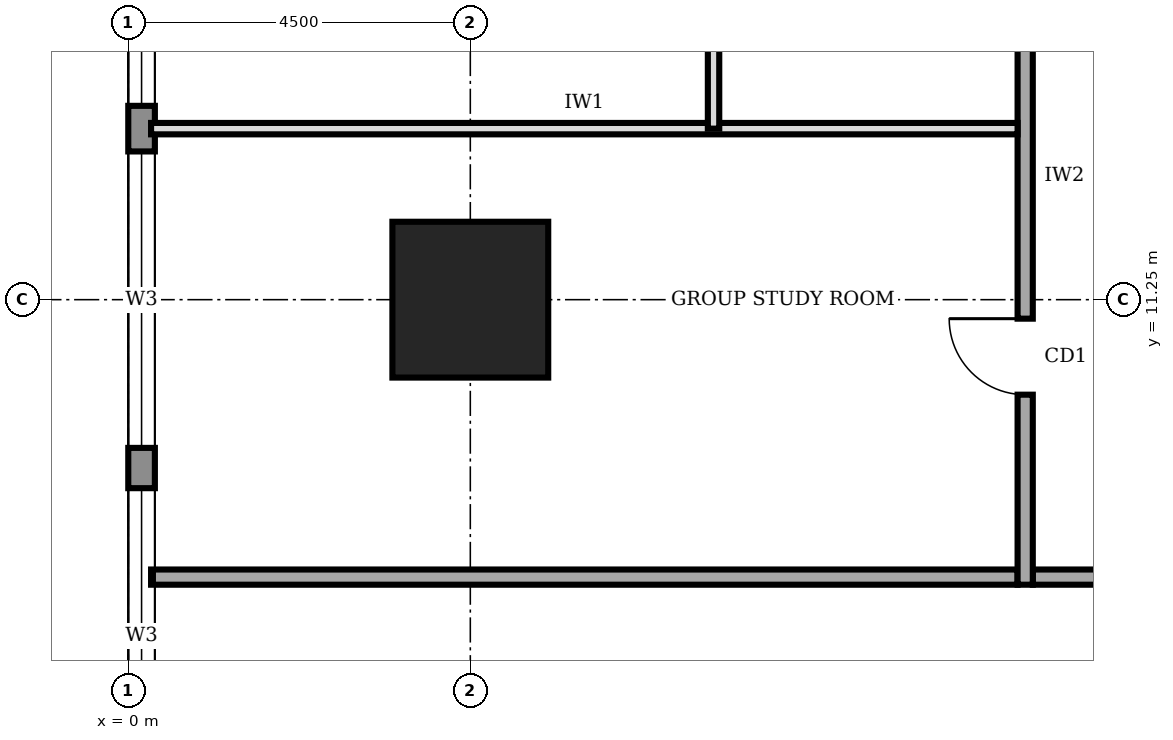
"""IFC4 building model, lengths in metres.
Left out: names, types, materials, properties, quantities, classifications, styles, units other than length and angle.
Written with IfcOpenShell. Run it as: python <this file> out.ifc"""

import sys

from ifc_helpers import new_model, si_unit, direction, frame, frame_2d, origin, origin_2d, place, context, subcontext, project, spatial, rectangle, extrude, element, fill, save


model = new_model("IFC4")
c1 = context("Model", 3, precision=1e-05, world=origin(), true_north=direction((0.0, 1.0)))
c2 = subcontext(c1, "Body", "Model", "MODEL_VIEW")
j1 = project(units=[si_unit("LENGTHUNIT", "METRE"), si_unit("PLANEANGLEUNIT", "RADIAN")], contexts=[c1])
p1 = place(None, origin())
s1 = spatial("IfcSite", under=j1, at=p1, CompositionType="ELEMENT")
p2 = place(p1, origin())
s2 = spatial("IfcBuilding", under=s1, at=p2, CompositionType="ELEMENT")
p3 = place(p2, frame((0.0, 0.0, 189.0)))
s3 = spatial("IfcBuildingStorey", under=s2, at=p3, CompositionType="ELEMENT", Elevation=189.0)
p4 = place(p3, frame((4.5, 11.25, 0.0), z_axis=(0.0, 0.0, 1.0), x_axis=(1.0, 0.0, 0.0)))
e1 = element("IfcColumn", 1, at=p4, inside=s3, PredefinedType="COLUMN", context=c2, shape_type="SweptSolid", body=[
    extrude(rectangle(XDim=2.05, YDim=2.05, at=origin_2d()), origin(), (0.0, 0.0, 1.0), 4.0),
])
p5 = place(p3, frame((0.175, 35.98, 0.0), z_axis=(0.0, 0.0, 1.0), x_axis=(0.0, -1.0, 0.0)))
e2 = element("IfcWall", 2, at=p5, inside=s3, PredefinedType="STANDARD", context=c2, shape_type="SweptSolid", body=[
    extrude(rectangle(XDim=31.46, YDim=0.35, at=frame_2d((15.73, 0.0))), origin(), (0.0, 0.0, 1.0), 3.75),
])
p6 = place(p5, frame((27.21, 0.0, 0.95)))
e3 = element("IfcOpeningElement", 3, at=p6, cuts=e2, PredefinedType="OPENING", context=c2, shape_type="SweptSolid", body=[
    extrude(rectangle(XDim=3.9, YDim=1.8, at=frame_2d((1.95, 0.9))), frame((0.0, 0.185, 0.0), z_axis=(0.0, -1.0, 0.0), x_axis=(1.0, 0.0, 0.0)), (0.0, 0.0, 1.0), 0.37),
])
p7 = place(p5, frame((22.78, 0.0, 0.95)))
e4 = element("IfcOpeningElement", 4, at=p7, cuts=e2, PredefinedType="OPENING", context=c2, shape_type="SweptSolid", body=[
    extrude(rectangle(XDim=3.9, YDim=1.8, at=frame_2d((1.95, 0.9))), frame((0.0, 0.185, 0.0), z_axis=(0.0, -1.0, 0.0), x_axis=(1.0, 0.0, 0.0)), (0.0, 0.0, 1.0), 0.37),
])
p8 = place(p5, frame((18.28, 0.0, 0.95)))
e5 = element("IfcOpeningElement", 5, at=p8, cuts=e2, PredefinedType="OPENING", context=c2, shape_type="SweptSolid", body=[
    extrude(rectangle(XDim=3.9, YDim=1.8, at=frame_2d((1.95, 0.9))), frame((0.0, 0.185, 0.0), z_axis=(0.0, -1.0, 0.0), x_axis=(1.0, 0.0, 0.0)), (0.0, 0.0, 1.0), 0.37),
])
p9 = place(p5, frame((13.78, 0.0, 0.95)))
e6 = element("IfcOpeningElement", 6, at=p9, cuts=e2, PredefinedType="OPENING", context=c2, shape_type="SweptSolid", body=[
    extrude(rectangle(XDim=3.9, YDim=1.8, at=frame_2d((1.95, 0.9))), frame((0.0, 0.185, 0.0), z_axis=(0.0, -1.0, 0.0), x_axis=(1.0, 0.0, 0.0)), (0.0, 0.0, 1.0), 0.37),
])
p10 = place(p5, frame((9.28, 0.0, 0.95)))
e7 = element("IfcOpeningElement", 7, at=p10, cuts=e2, PredefinedType="OPENING", context=c2, shape_type="SweptSolid", body=[
    extrude(rectangle(XDim=3.9, YDim=1.8, at=frame_2d((1.95, 0.9))), frame((0.0, 0.185, 0.0), z_axis=(0.0, -1.0, 0.0), x_axis=(1.0, 0.0, 0.0)), (0.0, 0.0, 1.0), 0.37),
])
p11 = place(p5, frame((4.78, 0.0, 0.95)))
e8 = element("IfcOpeningElement", 8, at=p11, cuts=e2, PredefinedType="OPENING", context=c2, shape_type="SweptSolid", body=[
    extrude(rectangle(XDim=3.9, YDim=1.8, at=frame_2d((1.95, 0.9))), frame((0.0, 0.185, 0.0), z_axis=(0.0, -1.0, 0.0), x_axis=(1.0, 0.0, 0.0)), (0.0, 0.0, 1.0), 0.37),
])
p12 = place(p3, frame((11.9, 7.6, 0.0), z_axis=(0.0, 0.0, 1.0), x_axis=(1.0, 0.0, 0.0)))
e9 = element("IfcWall", 9, at=p12, inside=s3, PredefinedType="SOLIDWALL", context=c2, shape_type="SweptSolid", body=[
    extrude(rectangle(XDim=16.9, YDim=0.2, at=frame_2d((8.45, 0.0))), origin(), (0.0, 0.0, 1.0), 3.75),
])
p13 = place(p12, frame((2.05, 0.0, 0.0)))
e10 = element("IfcOpeningElement", 10, at=p13, cuts=e9, PredefinedType="OPENING", context=c2, shape_type="SweptSolid", body=[
    extrude(rectangle(XDim=1.8, YDim=2.1, at=frame_2d((0.9, 1.05))), frame((0.0, 0.11, 0.0), z_axis=(0.0, -1.0, 0.0), x_axis=(1.0, 0.0, 0.0)), (0.0, 0.0, 1.0), 0.22),
])
p14 = place(p12, frame((7.85, 0.0, 0.0)))
e11 = element("IfcOpeningElement", 11, at=p14, cuts=e9, PredefinedType="OPENING", context=c2, shape_type="SweptSolid", body=[
    extrude(rectangle(XDim=1.0, YDim=2.1, at=frame_2d((0.5, 1.05))), frame((0.0, 0.11, 0.0), z_axis=(0.0, -1.0, 0.0), x_axis=(1.0, 0.0, 0.0)), (0.0, 0.0, 1.0), 0.22),
])
p15 = place(p12, frame((12.85, 0.0, 0.0)))
e12 = element("IfcOpeningElement", 12, at=p15, cuts=e9, PredefinedType="OPENING", context=c2, shape_type="SweptSolid", body=[
    extrude(rectangle(XDim=1.8, YDim=2.1, at=frame_2d((0.9, 1.05))), frame((0.0, 0.11, 0.0), z_axis=(0.0, -1.0, 0.0), x_axis=(1.0, 0.0, 0.0)), (0.0, 0.0, 1.0), 0.22),
])
p16 = place(p3, frame((11.8, 32.8, 0.0), z_axis=(0.0, 0.0, 1.0), x_axis=(0.0, -1.0, 0.0)))
e13 = element("IfcWall", 13, at=p16, inside=s3, PredefinedType="SOLIDWALL", context=c2, shape_type="SweptSolid", body=[
    extrude(rectangle(XDim=25.3, YDim=0.2, at=frame_2d((12.65, 0.0))), origin(), (0.0, 0.0, 1.0), 3.75),
])
p17 = place(p16, frame((21.8, 0.0, 0.0)))
e14 = element("IfcOpeningElement", 14, at=p17, cuts=e13, PredefinedType="OPENING", context=c2, shape_type="SweptSolid", body=[
    extrude(rectangle(XDim=1.0, YDim=2.1, at=frame_2d((0.5, 1.05))), frame((0.0, 0.11, 0.0), z_axis=(0.0, -1.0, 0.0), x_axis=(1.0, 0.0, 0.0)), (0.0, 0.0, 1.0), 0.22),
])
p18 = place(p16, frame((17.15, 0.0, 0.0)))
e15 = element("IfcOpeningElement", 15, at=p18, cuts=e13, PredefinedType="OPENING", context=c2, shape_type="SweptSolid", body=[
    extrude(rectangle(XDim=0.9, YDim=2.1, at=frame_2d((0.45, 1.05))), frame((0.0, 0.11, 0.0), z_axis=(0.0, -1.0, 0.0), x_axis=(1.0, 0.0, 0.0)), (0.0, 0.0, 1.0), 0.22),
])
p19 = place(p16, frame((12.35, 0.0, 0.0)))
e16 = element("IfcOpeningElement", 16, at=p19, cuts=e13, PredefinedType="OPENING", context=c2, shape_type="SweptSolid", body=[
    extrude(rectangle(XDim=0.9, YDim=2.1, at=frame_2d((0.45, 1.05))), frame((0.0, 0.11, 0.0), z_axis=(0.0, -1.0, 0.0), x_axis=(1.0, 0.0, 0.0)), (0.0, 0.0, 1.0), 0.22),
])
p20 = place(p16, frame((9.3, 0.0, 0.0)))
e17 = element("IfcOpeningElement", 17, at=p20, cuts=e13, PredefinedType="OPENING", context=c2, shape_type="SweptSolid", body=[
    extrude(rectangle(XDim=0.9, YDim=2.1, at=frame_2d((0.45, 1.05))), frame((0.0, 0.11, 0.0), z_axis=(0.0, -1.0, 0.0), x_axis=(1.0, 0.0, 0.0)), (0.0, 0.0, 1.0), 0.22),
])
p21 = place(p16, frame((6.3, 0.0, 0.0)))
e18 = element("IfcOpeningElement", 18, at=p21, cuts=e13, PredefinedType="OPENING", context=c2, shape_type="SweptSolid", body=[
    extrude(rectangle(XDim=1.0, YDim=2.1, at=frame_2d((0.5, 1.05))), frame((0.0, 0.11, 0.0), z_axis=(0.0, -1.0, 0.0), x_axis=(1.0, 0.0, 0.0)), (0.0, 0.0, 1.0), 0.22),
])
p22 = place(p16, frame((14.4, 0.0, 0.0)))
e19 = element("IfcOpeningElement", 19, at=p22, cuts=e13, PredefinedType="OPENING", context=c2, shape_type="SweptSolid", body=[
    extrude(rectangle(XDim=1.0, YDim=2.1, at=frame_2d((0.5, 1.05))), frame((0.0, 0.11, 0.0), z_axis=(0.0, -1.0, 0.0), x_axis=(1.0, 0.0, 0.0)), (0.0, 0.0, 1.0), 0.22),
])
p23 = place(p16, frame((2.3, 0.0, 0.0)))
e20 = element("IfcOpeningElement", 20, at=p23, cuts=e13, PredefinedType="OPENING", context=c2, shape_type="SweptSolid", body=[
    extrude(rectangle(XDim=1.0, YDim=2.1, at=frame_2d((0.5, 1.05))), frame((0.0, 0.11, 0.0), z_axis=(0.0, -1.0, 0.0), x_axis=(1.0, 0.0, 0.0)), (0.0, 0.0, 1.0), 0.22),
])
p24 = place(p3, frame((0.3, 7.6, 0.0), z_axis=(0.0, 0.0, 1.0), x_axis=(1.0, 0.0, 0.0)))
e21 = element("IfcWall", 21, at=p24, inside=s3, PredefinedType="SOLIDWALL", context=c2, shape_type="SweptSolid", body=[
    extrude(rectangle(XDim=11.4, YDim=0.2, at=frame_2d((5.7, 0.0))), origin(), (0.0, 0.0, 1.0), 3.75),
])
p25 = place(p3, frame((0.3, 13.5, 0.0), z_axis=(0.0, 0.0, 1.0), x_axis=(1.0, 0.0, 0.0)))
e22 = element("IfcWall", 22, at=p25, inside=s3, PredefinedType="PARTITIONING", context=c2, shape_type="SweptSolid", body=[
    extrude(rectangle(XDim=11.4, YDim=0.15, at=frame_2d((5.7, 0.0))), origin(), (0.0, 0.0, 1.0), 3.75),
])
p26 = place(p3, frame((7.7, 13.5, 0.0), z_axis=(0.0, 0.0, 1.0), x_axis=(0.0, 1.0, 0.0)))
e23 = element("IfcWall", 23, at=p26, inside=s3, PredefinedType="PARTITIONING", context=c2, shape_type="SweptSolid", body=[
    extrude(rectangle(XDim=3.4, YDim=0.15, at=frame_2d((1.7, 0.0))), origin(), (0.0, 0.0, 1.0), 3.75),
])
p27 = place(p6, origin())
e24 = element("IfcWindow", 24, at=p27, inside=s3, PartitioningType="SINGLE_PANEL", PredefinedType="WINDOW", context=c2, shape_type="SweptSolid", body=[
    extrude(rectangle(XDim=3.9, YDim=1.8, at=frame_2d((1.95, 0.9))), frame((0.0, 0.03, 0.0), z_axis=(0.0, -1.0, 0.0), x_axis=(1.0, 0.0, 0.0)), (0.0, 0.0, 1.0), 0.06),
])
fill(e3, e24)
p28 = place(p7, origin())
e25 = element("IfcWindow", 25, at=p28, inside=s3, PartitioningType="SINGLE_PANEL", PredefinedType="WINDOW", context=c2, shape_type="SweptSolid", body=[
    extrude(rectangle(XDim=3.9, YDim=1.8, at=frame_2d((1.95, 0.9))), frame((0.0, 0.03, 0.0), z_axis=(0.0, -1.0, 0.0), x_axis=(1.0, 0.0, 0.0)), (0.0, 0.0, 1.0), 0.06),
])
fill(e4, e25)
p29 = place(p8, origin())
e26 = element("IfcWindow", 26, at=p29, inside=s3, PartitioningType="SINGLE_PANEL", PredefinedType="WINDOW", context=c2, shape_type="SweptSolid", body=[
    extrude(rectangle(XDim=3.9, YDim=1.8, at=frame_2d((1.95, 0.9))), frame((0.0, 0.03, 0.0), z_axis=(0.0, -1.0, 0.0), x_axis=(1.0, 0.0, 0.0)), (0.0, 0.0, 1.0), 0.06),
])
fill(e5, e26)
p30 = place(p17, frame((1.0, 0.0, 0.0), z_axis=(0.0, 0.0, 1.0), x_axis=(-1.0, 0.0, 0.0)))
e27 = element("IfcDoor", 27, at=p30, inside=s3, OperationType="SINGLE_SWING_RIGHT", PredefinedType="DOOR", context=c2, shape_type="SweptSolid", body=[
    extrude(rectangle(XDim=1.0, YDim=2.1, at=frame_2d((0.5, 1.05))), frame((0.0, 0.025, 0.0), z_axis=(0.0, -1.0, 0.0), x_axis=(1.0, 0.0, 0.0)), (0.0, 0.0, 1.0), 0.05),
])
fill(e14, e27)
save(model, sys.argv[1])
